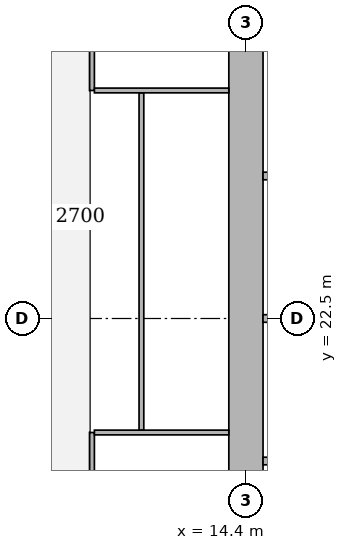
"""IFC4 building model, lengths in metres.
Left out: names, types, materials, properties, quantities, classifications, styles, units other than length and angle.
Written with IfcOpenShell. Run it as: python <this file> out.ifc"""

import sys

from ifc_helpers import new_model, si_unit, direction, frame, frame_2d, origin, place, context, subcontext, project, spatial, rectangle, extrude, element, fill, save


model = new_model("IFC4")
c1 = context("Model", 3, precision=1e-05, world=origin(), true_north=direction((0.0, 1.0)))
c2 = subcontext(c1, "Body", "Model", "MODEL_VIEW")
j1 = project(units=[si_unit("LENGTHUNIT", "METRE"), si_unit("PLANEANGLEUNIT", "RADIAN")], contexts=[c1])
p1 = place(None, origin())
s1 = spatial("IfcSite", under=j1, at=p1, CompositionType="ELEMENT")
p2 = place(p1, origin())
s2 = spatial("IfcBuilding", under=s1, at=p2, CompositionType="ELEMENT")
p3 = place(p2, frame((0.0, 0.0, 42.5)))
s3 = spatial("IfcBuildingStorey", under=s2, at=p3, CompositionType="ELEMENT", Elevation=42.5)
p4 = place(p3, frame((14.4, 15.45, 0.0), z_axis=(0.0, 0.0, 1.0), x_axis=(0.0, 1.0, 0.0)))
e1 = element("IfcWall", 1, at=p4, inside=s3, PredefinedType="SHEAR", context=c2, shape_type="SweptSolid", body=[
    extrude(rectangle(XDim=14.1, YDim=0.9, at=frame_2d((7.05, 0.0))), origin(), (0.0, 0.0, 1.0), 3.75),
])
p5 = place(p3, frame((10.35, 10.3, 0.0), z_axis=(0.0, 0.0, 1.0), x_axis=(0.0, 1.0, 0.0)))
e2 = element("IfcWall", 2, at=p5, inside=s3, PredefinedType="PARTITIONING", context=c2, shape_type="SweptSolid", body=[
    extrude(rectangle(XDim=9.2, YDim=0.125, at=frame_2d((4.6, 0.0))), origin(), (0.0, 0.0, 1.0), 3.5),
])
p6 = place(p5, frame((1.55, 0.0, 0.0)))
e3 = element("IfcOpeningElement", 3, at=p6, cuts=e2, PredefinedType="OPENING", context=c2, shape_type="SweptSolid", body=[
    extrude(rectangle(XDim=1.0, YDim=2.1, at=frame_2d((0.5, 1.05))), frame((0.0, 0.073, 0.0), z_axis=(0.0, -1.0, 0.0), x_axis=(1.0, 0.0, 0.0)), (0.0, 0.0, 1.0), 0.145),
])
p7 = place(p5, frame((6.15, 0.0, 0.0)))
e4 = element("IfcOpeningElement", 4, at=p7, cuts=e2, PredefinedType="OPENING", context=c2, shape_type="SweptSolid", body=[
    extrude(rectangle(XDim=1.0, YDim=2.1, at=frame_2d((0.5, 1.05))), frame((0.0, 0.073, 0.0), z_axis=(0.0, -1.0, 0.0), x_axis=(1.0, 0.0, 0.0)), (0.0, 0.0, 1.0), 0.145),
])
p8 = place(p3, frame((10.35, 28.5, 0.0), z_axis=(0.0, 0.0, 1.0), x_axis=(0.0, 1.0, 0.0)))
e5 = element("IfcWall", 5, at=p8, inside=s3, PredefinedType="PARTITIONING", context=c2, shape_type="SweptSolid", body=[
    extrude(rectangle(XDim=6.2, YDim=0.125, at=frame_2d((3.1, 0.0))), origin(), (0.0, 0.0, 1.0), 3.5),
])
p9 = place(p8, frame((0.85, 0.0, 0.0)))
e6 = element("IfcOpeningElement", 6, at=p9, cuts=e5, PredefinedType="OPENING", context=c2, shape_type="SweptSolid", body=[
    extrude(rectangle(XDim=1.0, YDim=2.1, at=frame_2d((0.5, 1.05))), frame((0.0, 0.073, 0.0), z_axis=(0.0, -1.0, 0.0), x_axis=(1.0, 0.0, 0.0)), (0.0, 0.0, 1.0), 0.145),
])
p10 = place(p8, frame((3.95, 0.0, 0.0)))
e7 = element("IfcOpeningElement", 7, at=p10, cuts=e5, PredefinedType="OPENING", context=c2, shape_type="SweptSolid", body=[
    extrude(rectangle(XDim=1.0, YDim=2.1, at=frame_2d((0.5, 1.05))), frame((0.0, 0.073, 0.0), z_axis=(0.0, -1.0, 0.0), x_axis=(1.0, 0.0, 0.0)), (0.0, 0.0, 1.0), 0.145),
])
p11 = place(p3, frame((11.65, 19.562, 0.0), z_axis=(0.0, 0.0, 1.0), x_axis=(0.0, 1.0, 0.0)))
e8 = element("IfcWall", 8, at=p11, inside=s3, PredefinedType="PARTITIONING", context=c2, shape_type="SweptSolid", body=[
    extrude(rectangle(XDim=8.876, YDim=0.125, at=frame_2d((4.438, 0.0))), origin(), (0.0, 0.0, 1.0), 3.5),
])
p12 = place(p11, frame((3.938, 0.0, 0.0)))
e9 = element("IfcOpeningElement", 9, at=p12, cuts=e8, PredefinedType="OPENING", context=c2, shape_type="SweptSolid", body=[
    extrude(rectangle(XDim=1.0, YDim=2.1, at=frame_2d((0.5, 1.05))), frame((0.0, 0.073, 0.0), z_axis=(0.0, -1.0, 0.0), x_axis=(1.0, 0.0, 0.0)), (0.0, 0.0, 1.0), 0.145),
])
for number, where, z_axis, x_axis in (
    (10, (10.413, 19.5, 0.0), (0.0, 0.0, 1.0), (1.0, 0.0, 0.0)),
    (11, (10.413, 28.5, 0.0), (0.0, 0.0, 1.0), (1.0, 0.0, 0.0)),
):
    element("IfcWall", number, at=place(p3, frame(where, z_axis=z_axis, x_axis=x_axis)), inside=s3, PredefinedType="PARTITIONING", context=c2, shape_type="SweptSolid", body=[
        extrude(rectangle(XDim=3.537, YDim=0.125, at=frame_2d((1.769, 0.0))), origin(), (0.0, 0.0, 1.0), 3.5),
    ])
for number, where, z_axis, x_axis in (
    (12, (14.85, 18.75, 0.0), (0.0, 0.0, 1.0), (1.0, 0.0, 0.0)),
    (13, (14.85, 22.5, 0.0), (0.0, 0.0, 1.0), (1.0, 0.0, 0.0)),
    (14, (14.85, 26.25, 0.0), (0.0, 0.0, 1.0), (1.0, 0.0, 0.0)),
):
    element("IfcWall", number, at=place(p3, frame(where, z_axis=z_axis, x_axis=x_axis)), inside=s3, PredefinedType="SOLIDWALL", context=c2, shape_type="SweptSolid", body=[
        extrude(rectangle(XDim=1.95, YDim=0.2, at=frame_2d((0.975, 0.0))), origin(), (0.0, 0.0, 1.0), 3.5),
    ])
p13 = place(p12, origin())
e15 = element("IfcDoor", 15, at=p13, inside=s3, OperationType="SINGLE_SWING_LEFT", PredefinedType="DOOR", context=c2, shape_type="SweptSolid", body=[
    extrude(rectangle(XDim=1.0, YDim=2.1, at=frame_2d((0.5, 1.05))), frame((0.0, 0.025, 0.0), z_axis=(0.0, -1.0, 0.0), x_axis=(1.0, 0.0, 0.0)), (0.0, 0.0, 1.0), 0.05),
])
fill(e9, e15)
p14 = place(p9, origin())
e16 = element("IfcDoor", 16, at=p14, inside=s3, OperationType="SINGLE_SWING_RIGHT", PredefinedType="DOOR", context=c2, shape_type="SweptSolid", body=[
    extrude(rectangle(XDim=1.0, YDim=2.1, at=frame_2d((0.5, 1.05))), frame((0.0, 0.025, 0.0), z_axis=(0.0, -1.0, 0.0), x_axis=(1.0, 0.0, 0.0)), (0.0, 0.0, 1.0), 0.05),
])
fill(e6, e16)
save(model, sys.argv[1])
